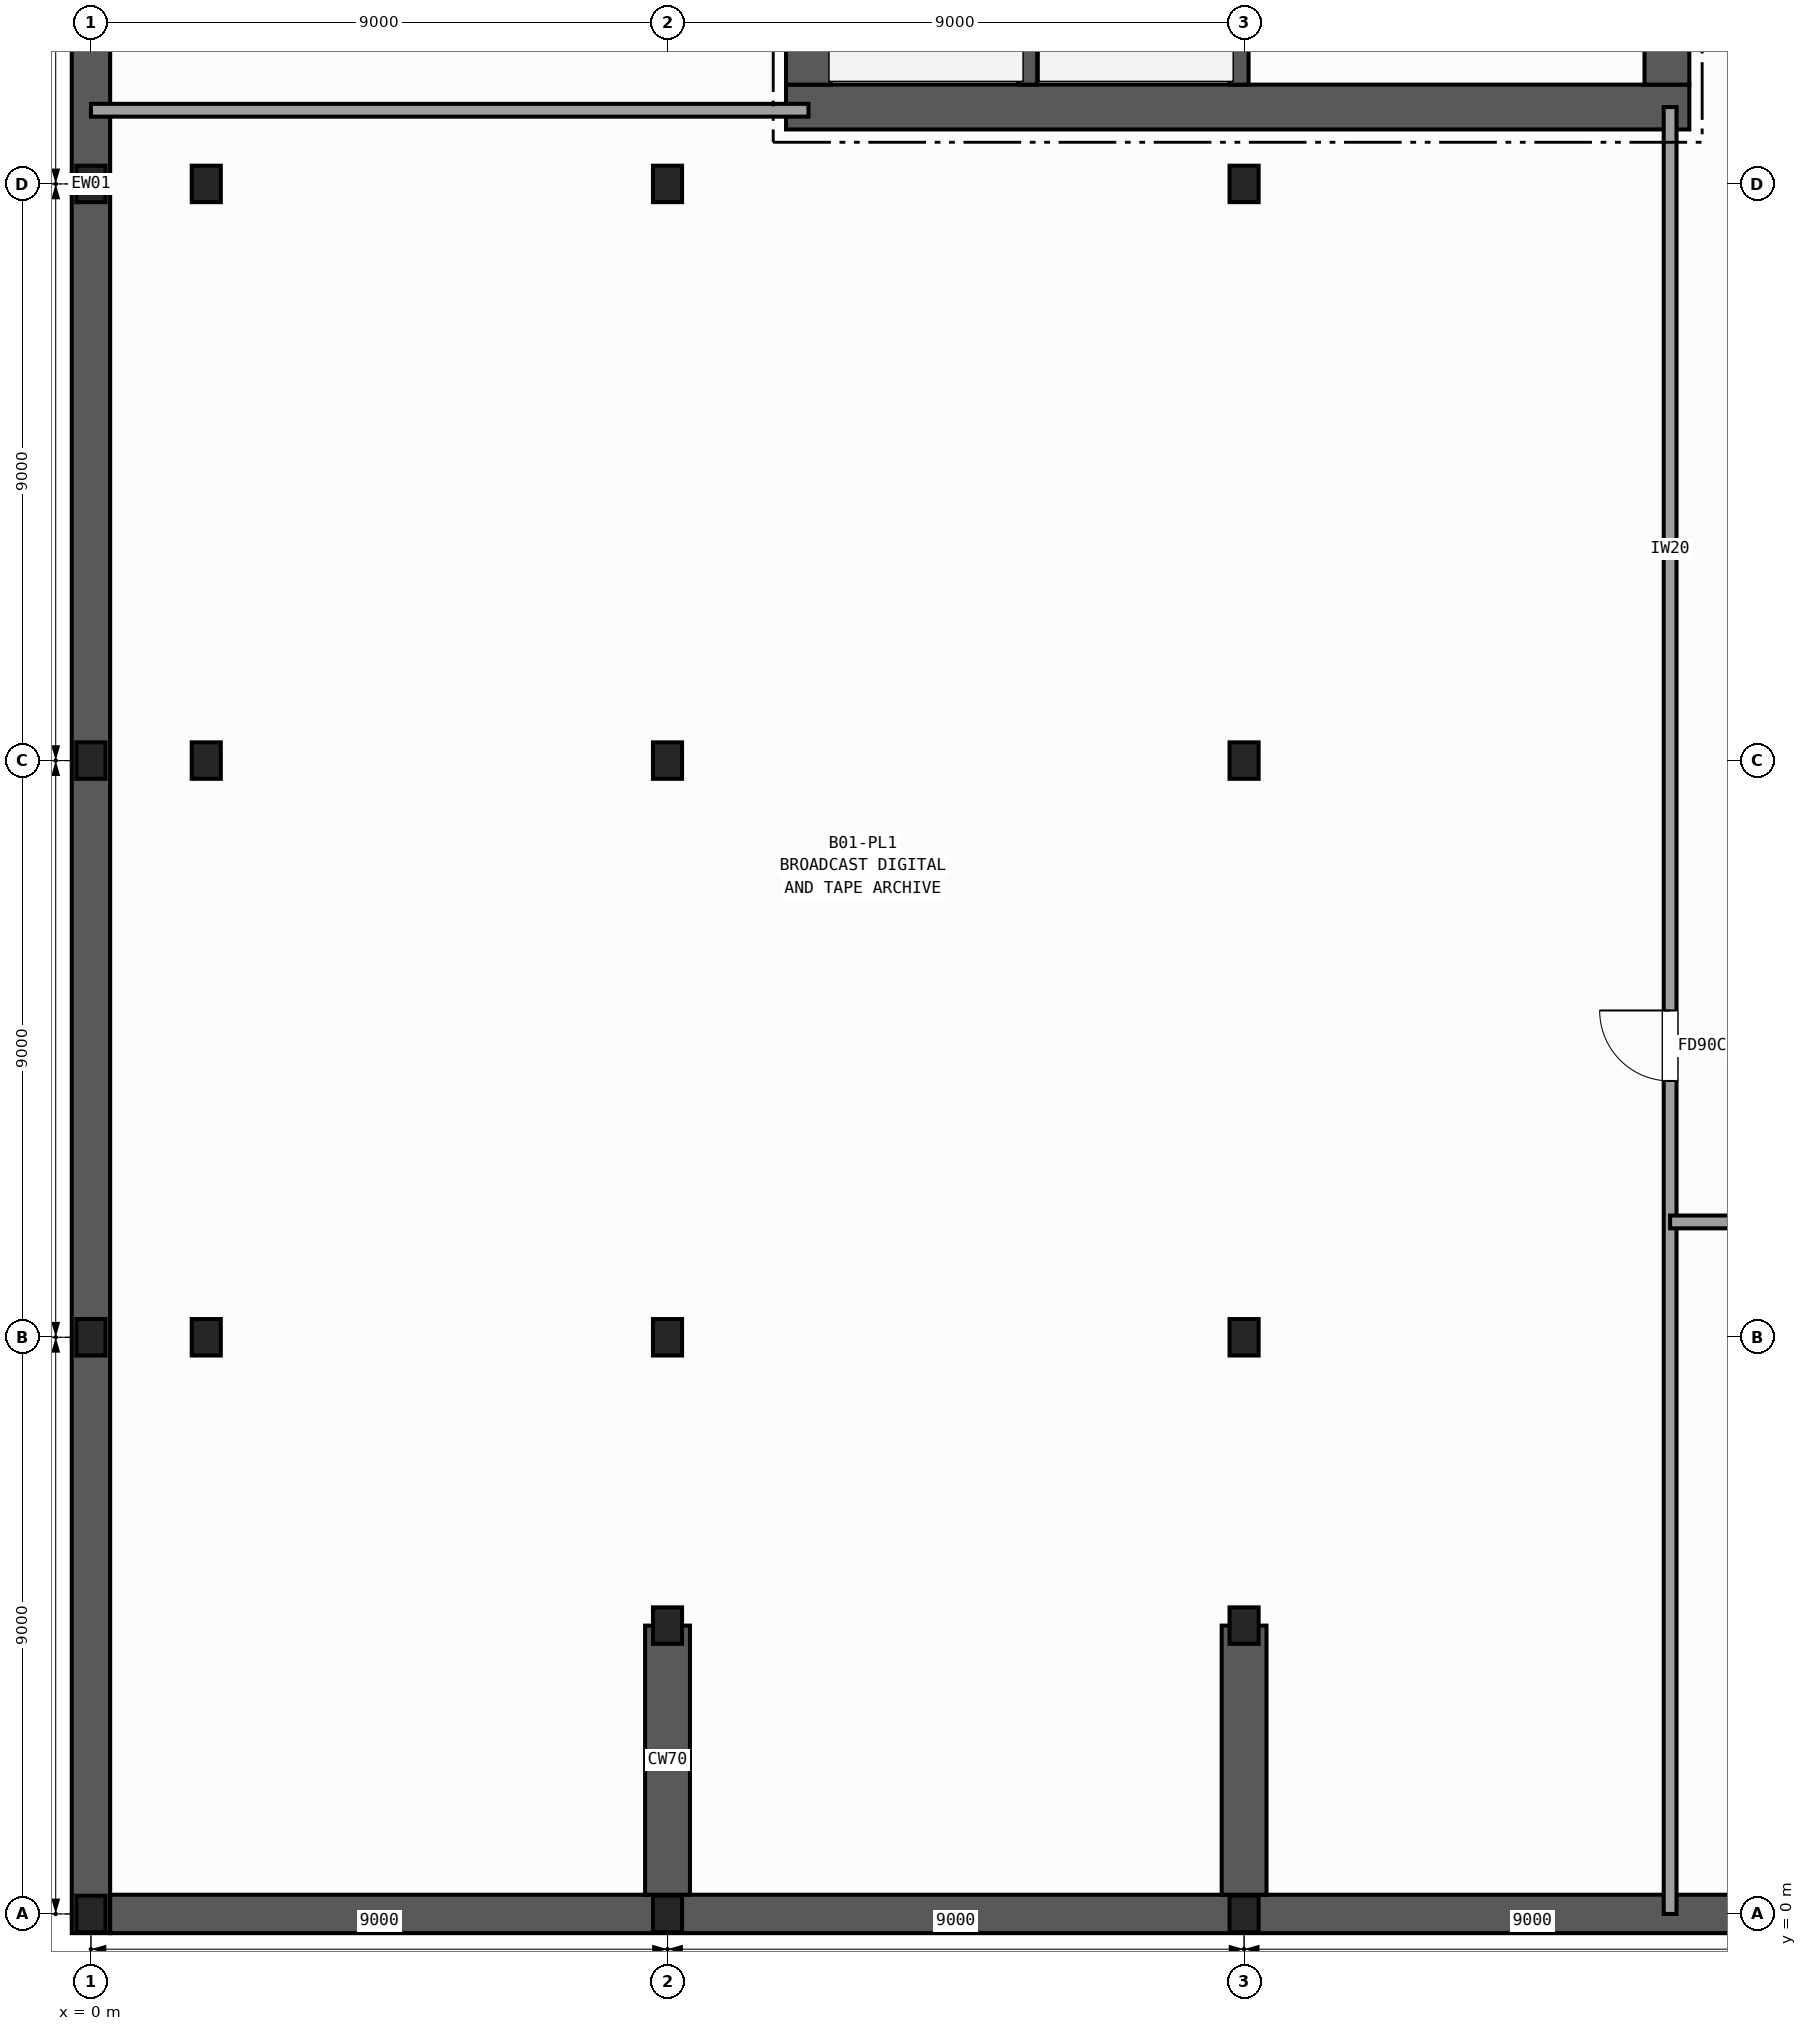
"""IFC4 building model, lengths in metres.
Left out: names, types, materials, properties, quantities, classifications, styles, units other than length and angle.
Written with IfcOpenShell. Run it as: python <this file> out.ifc"""

import sys

from ifc_helpers import new_model, si_unit, direction, frame, frame_2d, origin, origin_2d, place, context, subcontext, project, spatial, rectangle, i_section, extrude, element, fill, save


model = new_model("IFC4")
c1 = context("Model", 3, precision=1e-05, world=origin(), true_north=direction((0.0, 1.0)))
c2 = subcontext(c1, "Body", "Model", "MODEL_VIEW")
j1 = project(units=[si_unit("LENGTHUNIT", "METRE"), si_unit("PLANEANGLEUNIT", "RADIAN")], contexts=[c1])
p1 = place(None, origin())
s1 = spatial("IfcSite", under=j1, at=p1, CompositionType="ELEMENT")
p2 = place(p1, origin())
s2 = spatial("IfcBuilding", under=s1, at=p2, CompositionType="ELEMENT")
p3 = place(p2, frame((0.0, 0.0, -4.5)))
s3 = spatial("IfcBuildingStorey", under=s2, at=p3, CompositionType="ELEMENT", Elevation=-4.5)
for number, where, z_axis, x_axis in (
    (1, (0.0, 0.0, 0.0), (0.0, 0.0, 1.0), (1.0, 0.0, 0.0)),
    (2, (0.0, 9.0, 0.0), (0.0, 0.0, 1.0), (1.0, 0.0, 0.0)),
    (3, (0.0, 18.0, 0.0), (0.0, 0.0, 1.0), (1.0, 0.0, 0.0)),
    (4, (0.0, 27.0, 0.0), (0.0, 0.0, 1.0), (1.0, 0.0, 0.0)),
    (5, (9.0, 0.0, 0.0), (0.0, 0.0, 1.0), (1.0, 0.0, 0.0)),
    (6, (9.0, 9.0, 0.0), (0.0, 0.0, 1.0), (1.0, 0.0, 0.0)),
    (7, (9.0, 18.0, 0.0), (0.0, 0.0, 1.0), (1.0, 0.0, 0.0)),
    (8, (9.0, 27.0, 0.0), (0.0, 0.0, 1.0), (1.0, 0.0, 0.0)),
    (9, (18.0, 0.0, 0.0), (0.0, 0.0, 1.0), (1.0, 0.0, 0.0)),
    (10, (18.0, 9.0, 0.0), (0.0, 0.0, 1.0), (1.0, 0.0, 0.0)),
    (11, (18.0, 18.0, 0.0), (0.0, 0.0, 1.0), (1.0, 0.0, 0.0)),
    (12, (18.0, 27.0, 0.0), (0.0, 0.0, 1.0), (1.0, 0.0, 0.0)),
    (13, (9.0, 4.5, 0.0), (0.0, 0.0, 1.0), (1.0, 0.0, 0.0)),
    (14, (18.0, 4.5, 0.0), (0.0, 0.0, 1.0), (1.0, 0.0, 0.0)),
    (15, (1.8, 9.0, 0.0), (0.0, 0.0, 1.0), (1.0, 0.0, 0.0)),
    (16, (1.8, 18.0, 0.0), (0.0, 0.0, 1.0), (1.0, 0.0, 0.0)),
    (17, (1.8, 27.0, 0.0), (0.0, 0.0, 1.0), (1.0, 0.0, 0.0)),
):
    element("IfcColumn", number, at=place(p3, frame(where, z_axis=z_axis, x_axis=x_axis)), inside=s3, PredefinedType="COLUMN", context=c2, shape_type="SweptSolid", body=[
        extrude(i_section(OverallWidth=0.454, OverallDepth=0.569, WebThickness=0.078, FlangeThickness=0.125, FilletRadius=0.015, at=origin_2d()), origin(), (0.0, 0.0, 1.0), 4.5),
    ])
p4 = place(p3, frame((0.0, -0.3, 0.0), z_axis=(0.0, 0.0, 1.0), x_axis=(0.0, 1.0, 0.0)))
e18 = element("IfcWall", 18, at=p4, inside=s3, PredefinedType="SOLIDWALL", context=c2, shape_type="SweptSolid", body=[
    extrude(rectangle(XDim=54.6, YDim=0.6, at=frame_2d((27.3, 0.0))), origin(), (0.0, 0.0, 1.0), 4.18),
])
p5 = place(p3, frame((62.7, 0.0, 0.0), z_axis=(0.0, 0.0, 1.0), x_axis=(-1.0, 0.0, 0.0)))
e19 = element("IfcWall", 19, at=p5, inside=s3, PredefinedType="SOLIDWALL", context=c2, shape_type="SweptSolid", body=[
    extrude(rectangle(XDim=62.4, YDim=0.6, at=frame_2d((31.2, 0.0))), origin(), (0.0, 0.0, 1.0), 4.18),
])
for number, where, z_axis, x_axis in (
    (20, (9.0, 0.3, 0.0), (0.0, 0.0, 1.0), (0.0, 1.0, 0.0)),
    (21, (18.0, 0.3, 0.0), (0.0, 0.0, 1.0), (0.0, 1.0, 0.0)),
):
    element("IfcWall", number, at=place(p3, frame(where, z_axis=z_axis, x_axis=x_axis)), inside=s3, PredefinedType="SHEAR", context=c2, shape_type="SweptSolid", body=[
        extrude(rectangle(XDim=4.2, YDim=0.7, at=frame_2d((2.1, 0.0))), origin(), (0.0, 0.0, 1.0), 4.18),
    ])
p6 = place(p3, frame((10.85, 28.2, 0.0), z_axis=(0.0, 0.0, 1.0), x_axis=(1.0, 0.0, 0.0)))
e22 = element("IfcWall", 22, at=p6, inside=s3, PredefinedType="SHEAR", context=c2, shape_type="SweptSolid", body=[
    extrude(rectangle(XDim=14.1, YDim=0.7, at=frame_2d((7.05, 0.0))), origin(), (0.0, 0.0, 1.0), 4.18),
])
p7 = place(p3, frame((11.2, 42.05, 0.0), z_axis=(0.0, 0.0, 1.0), x_axis=(0.0, -1.0, 0.0)))
e23 = element("IfcWall", 23, at=p7, inside=s3, PredefinedType="SHEAR", context=c2, shape_type="SweptSolid", body=[
    extrude(rectangle(XDim=13.5, YDim=0.7, at=frame_2d((6.75, 0.0))), origin(), (0.0, 0.0, 1.0), 4.18),
])
p8 = place(p3, frame((24.6, 28.55, 0.0), z_axis=(0.0, 0.0, 1.0), x_axis=(0.0, 1.0, 0.0)))
e24 = element("IfcWall", 24, at=p8, inside=s3, PredefinedType="SHEAR", context=c2, shape_type="SweptSolid", body=[
    extrude(rectangle(XDim=13.5, YDim=0.7, at=frame_2d((6.75, 0.0))), origin(), (0.0, 0.0, 1.0), 4.18),
])
p9 = place(p8, frame((3.25, 0.0, 0.0)))
e25 = element("IfcOpeningElement", 25, at=p9, cuts=e24, PredefinedType="OPENING", context=c2, shape_type="SweptSolid", body=[
    extrude(rectangle(XDim=1.5, YDim=2.2, at=frame_2d((0.75, 1.1))), frame((0.0, 0.36, 0.0), z_axis=(0.0, -1.0, 0.0), x_axis=(1.0, 0.0, 0.0)), (0.0, 0.0, 1.0), 0.72),
])
p10 = place(p8, frame((9.85, 0.0, 0.0)))
e26 = element("IfcOpeningElement", 26, at=p10, cuts=e24, PredefinedType="OPENING", context=c2, shape_type="SweptSolid", body=[
    extrude(rectangle(XDim=0.9, YDim=2.1, at=frame_2d((0.45, 1.05))), frame((0.0, 0.36, 0.0), z_axis=(0.0, -1.0, 0.0), x_axis=(1.0, 0.0, 0.0)), (0.0, 0.0, 1.0), 0.72),
])
p11 = place(p3, frame((14.62, 28.55, 0.0), z_axis=(0.0, 0.0, 1.0), x_axis=(0.0, 1.0, 0.0)))
e27 = element("IfcWall", 27, at=p11, inside=s3, PredefinedType="SHEAR", context=c2, shape_type="SweptSolid", body=[
    extrude(rectangle(XDim=8.9, YDim=0.3, at=frame_2d((4.45, 0.0))), origin(), (0.0, 0.0, 1.0), 4.18),
])
p12 = place(p3, frame((17.92, 42.05, 0.0), z_axis=(0.0, 0.0, 1.0), x_axis=(0.0, -1.0, 0.0)))
e28 = element("IfcWall", 28, at=p12, inside=s3, PredefinedType="SHEAR", context=c2, shape_type="SweptSolid", body=[
    extrude(rectangle(XDim=13.5, YDim=0.3, at=frame_2d((6.75, 0.0))), origin(), (0.0, 0.0, 1.0), 4.18),
])
p13 = place(p12, frame((1.875, 0.0, 0.0)))
e29 = element("IfcOpeningElement", 29, at=p13, cuts=e28, PredefinedType="OPENING", context=c2, shape_type="SweptSolid", body=[
    extrude(rectangle(XDim=1.15, YDim=2.15, at=frame_2d((0.575, 1.075))), frame((0.0, 0.16, 0.0), z_axis=(0.0, -1.0, 0.0), x_axis=(1.0, 0.0, 0.0)), (0.0, 0.0, 1.0), 0.32),
])
p14 = place(p3, frame((24.65, 0.0, 0.0), z_axis=(0.0, 0.0, 1.0), x_axis=(0.0, 1.0, 0.0)))
e30 = element("IfcWall", 30, at=p14, inside=s3, PredefinedType="PARTITIONING", context=c2, shape_type="SweptSolid", body=[
    extrude(rectangle(XDim=28.2, YDim=0.2, at=frame_2d((14.1, 0.0))), origin(), (0.0, 0.0, 1.0), 3.233),
])
p15 = place(p14, frame((13.0, 0.0, 0.0)))
e31 = element("IfcOpeningElement", 31, at=p15, cuts=e30, PredefinedType="OPENING", context=c2, shape_type="SweptSolid", body=[
    extrude(rectangle(XDim=1.1, YDim=2.15, at=frame_2d((0.55, 1.075))), frame((0.0, 0.11, 0.0), z_axis=(0.0, -1.0, 0.0), x_axis=(1.0, 0.0, 0.0)), (0.0, 0.0, 1.0), 0.22),
])
p16 = place(p3, frame((0.0, 28.15, 0.0), z_axis=(0.0, 0.0, 1.0), x_axis=(1.0, 0.0, 0.0)))
e32 = element("IfcWall", 32, at=p16, inside=s3, PredefinedType="PARTITIONING", context=c2, shape_type="SweptSolid", body=[
    extrude(rectangle(XDim=11.2, YDim=0.2, at=frame_2d((5.6, 0.0))), origin(), (0.0, 0.0, 1.0), 3.305),
])
p17 = place(p3, frame((24.65, 10.8, 0.0), z_axis=(0.0, 0.0, 1.0), x_axis=(1.0, 0.0, 0.0)))
e33 = element("IfcWall", 33, at=p17, inside=s3, PredefinedType="PARTITIONING", context=c2, shape_type="SweptSolid", body=[
    extrude(rectangle(XDim=38.35, YDim=0.2, at=frame_2d((19.175, 0.0))), origin(), (0.0, 0.0, 1.0), 3.305),
])
p18 = place(p17, frame((2.0, 0.0, 0.0)))
e34 = element("IfcOpeningElement", 34, at=p18, cuts=e33, PredefinedType="OPENING", context=c2, shape_type="SweptSolid", body=[
    extrude(rectangle(XDim=1.1, YDim=2.15, at=frame_2d((0.55, 1.075))), frame((0.0, 0.11, 0.0), z_axis=(0.0, -1.0, 0.0), x_axis=(1.0, 0.0, 0.0)), (0.0, 0.0, 1.0), 0.22),
])
p19 = place(p15, origin())
e35 = element("IfcDoor", 35, at=p19, inside=s3, OperationType="SINGLE_SWING_RIGHT", PredefinedType="DOOR", context=c2, shape_type="SweptSolid", body=[
    extrude(rectangle(XDim=1.1, YDim=2.15, at=frame_2d((0.55, 1.075))), frame((0.0, 0.025, 0.0), z_axis=(0.0, -1.0, 0.0), x_axis=(1.0, 0.0, 0.0)), (0.0, 0.0, 1.0), 0.05),
])
fill(e31, e35)
save(model, sys.argv[1])
